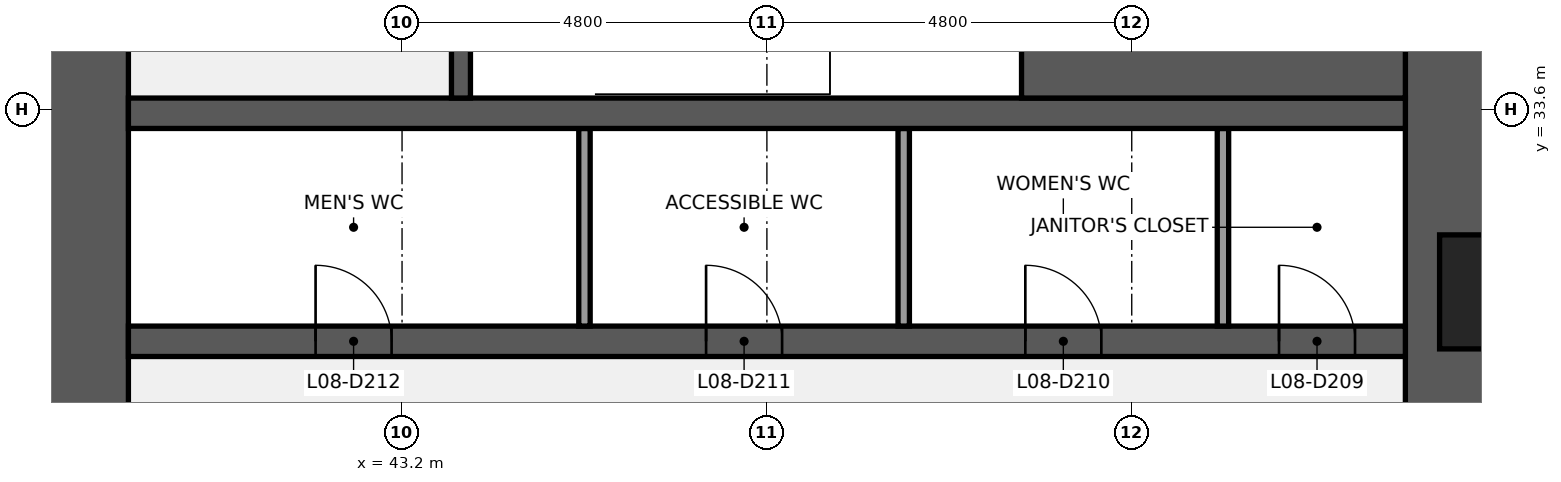
"""IFC4 building model, lengths in metres.
Left out: names, types, materials, properties, quantities, classifications, styles, units other than length and angle.
Written with IfcOpenShell. Run it as: python <this file> out.ifc"""

import sys

from ifc_helpers import new_model, si_unit, direction, frame, frame_2d, origin, place, context, subcontext, project, spatial, rectangle, extrude, element, fill, save


model = new_model("IFC4")
c1 = context("Model", 3, precision=1e-05, world=origin(), true_north=direction((0.0, 1.0)))
c2 = subcontext(c1, "Body", "Model", "MODEL_VIEW")
j1 = project(units=[si_unit("LENGTHUNIT", "METRE"), si_unit("PLANEANGLEUNIT", "RADIAN")], contexts=[c1])
p1 = place(None, origin())
s1 = spatial("IfcSite", under=j1, at=p1, CompositionType="ELEMENT")
p2 = place(p1, origin())
s2 = spatial("IfcBuilding", under=s1, at=p2, CompositionType="ELEMENT")
p3 = place(p2, frame((0.0, 0.0, 43.0)))
s3 = spatial("IfcBuildingStorey", under=s2, at=p3, CompositionType="ELEMENT", Elevation=43.0)
p4 = place(p3, frame((57.0, 38.4, 0.0), z_axis=(0.0, 0.0, 1.0), x_axis=(0.0, -1.0, 0.0)))
e1 = element("IfcWall", 1, at=p4, inside=s3, PredefinedType="SHEAR", context=c2, shape_type="SweptSolid", body=[
    extrude(rectangle(XDim=28.8, YDim=1.2, at=frame_2d((14.4, 0.0))), origin(), (0.0, 0.0, 1.0), 3.84),
])
p5 = place(p4, frame((18.45, 0.0, 0.9)))
e2 = element("IfcOpeningElement", 2, at=p5, cuts=e1, PredefinedType="OPENING", context=c2, shape_type="SweptSolid", body=[
    extrude(rectangle(XDim=1.5, YDim=1.5, at=frame_2d((0.75, 0.75))), frame((0.0, 0.61, 0.0), z_axis=(0.0, -1.0, 0.0), x_axis=(1.0, 0.0, 0.0)), (0.0, 0.0, 1.0), 1.22),
])
p6 = place(p4, frame((8.85, 0.0, 0.9)))
e3 = element("IfcOpeningElement", 3, at=p6, cuts=e1, PredefinedType="OPENING", context=c2, shape_type="SweptSolid", body=[
    extrude(rectangle(XDim=1.5, YDim=1.5, at=frame_2d((0.75, 0.75))), frame((0.0, 0.61, 0.0), z_axis=(0.0, -1.0, 0.0), x_axis=(1.0, 0.0, 0.0)), (0.0, 0.0, 1.0), 1.22),
])
p7 = place(p3, frame((39.0, 9.6, 0.0), z_axis=(0.0, 0.0, 1.0), x_axis=(0.0, 1.0, 0.0)))
e4 = element("IfcWall", 4, at=p7, inside=s3, PredefinedType="SHEAR", context=c2, shape_type="SweptSolid", body=[
    extrude(rectangle(XDim=28.8, YDim=1.2, at=frame_2d((14.4, 0.0))), origin(), (0.0, 0.0, 1.0), 3.84),
])
p8 = place(p7, frame((8.7, 0.0, 0.0)))
e5 = element("IfcOpeningElement", 5, at=p8, cuts=e4, PredefinedType="OPENING", context=c2, shape_type="SweptSolid", body=[
    extrude(rectangle(XDim=1.8, YDim=2.1, at=frame_2d((0.9, 1.05))), frame((0.0, 0.61, 0.0), z_axis=(0.0, -1.0, 0.0), x_axis=(1.0, 0.0, 0.0)), (0.0, 0.0, 1.0), 1.22),
])
p9 = place(p7, frame((18.3, 0.0, 0.0)))
e6 = element("IfcOpeningElement", 6, at=p9, cuts=e4, PredefinedType="OPENING", context=c2, shape_type="SweptSolid", body=[
    extrude(rectangle(XDim=1.8, YDim=2.1, at=frame_2d((0.9, 1.05))), frame((0.0, 0.61, 0.0), z_axis=(0.0, -1.0, 0.0), x_axis=(1.0, 0.0, 0.0)), (0.0, 0.0, 1.0), 1.22),
])
p10 = place(p3, frame((39.6, 30.55, 0.0), z_axis=(0.0, 0.0, 1.0), x_axis=(1.0, 0.0, 0.0)))
e7 = element("IfcWall", 7, at=p10, inside=s3, PredefinedType="SHEAR", context=c2, shape_type="SweptSolid", body=[
    extrude(rectangle(XDim=16.8, YDim=0.4, at=frame_2d((8.4, 0.0))), origin(), (0.0, 0.0, 1.0), 3.84),
])
p11 = place(p10, frame((15.137, 0.0, 0.0)))
e8 = element("IfcOpeningElement", 8, at=p11, cuts=e7, PredefinedType="OPENING", context=c2, shape_type="SweptSolid", body=[
    extrude(rectangle(XDim=1.0, YDim=2.1, at=frame_2d((0.5, 1.05))), frame((0.0, 0.21, 0.0), z_axis=(0.0, -1.0, 0.0), x_axis=(1.0, 0.0, 0.0)), (0.0, 0.0, 1.0), 0.42),
])
p12 = place(p10, frame((11.8, 0.0, 0.0)))
e9 = element("IfcOpeningElement", 9, at=p12, cuts=e7, PredefinedType="OPENING", context=c2, shape_type="SweptSolid", body=[
    extrude(rectangle(XDim=1.0, YDim=2.1, at=frame_2d((0.5, 1.05))), frame((0.0, 0.21, 0.0), z_axis=(0.0, -1.0, 0.0), x_axis=(1.0, 0.0, 0.0)), (0.0, 0.0, 1.0), 0.42),
])
p13 = place(p10, frame((7.6, 0.0, 0.0)))
e10 = element("IfcOpeningElement", 10, at=p13, cuts=e7, PredefinedType="OPENING", context=c2, shape_type="SweptSolid", body=[
    extrude(rectangle(XDim=1.0, YDim=2.1, at=frame_2d((0.5, 1.05))), frame((0.0, 0.21, 0.0), z_axis=(0.0, -1.0, 0.0), x_axis=(1.0, 0.0, 0.0)), (0.0, 0.0, 1.0), 0.42),
])
p14 = place(p10, frame((2.462, 0.0, 0.0)))
e11 = element("IfcOpeningElement", 11, at=p14, cuts=e7, PredefinedType="OPENING", context=c2, shape_type="SweptSolid", body=[
    extrude(rectangle(XDim=1.0, YDim=2.1, at=frame_2d((0.5, 1.05))), frame((0.0, 0.21, 0.0), z_axis=(0.0, -1.0, 0.0), x_axis=(1.0, 0.0, 0.0)), (0.0, 0.0, 1.0), 0.42),
])
for number, where, z_axis, x_axis in (
    (12, (54.0, 30.75, 0.0), (0.0, 0.0, 1.0), (0.0, 1.0, 0.0)),
    (13, (49.8, 30.75, 0.0), (0.0, 0.0, 1.0), (0.0, 1.0, 0.0)),
    (14, (45.6, 30.75, 0.0), (0.0, 0.0, 1.0), (0.0, 1.0, 0.0)),
):
    element("IfcWall", number, at=place(p3, frame(where, z_axis=z_axis, x_axis=x_axis)), inside=s3, PredefinedType="PARTITIONING", context=c2, shape_type="SweptSolid", body=[
        extrude(rectangle(XDim=2.6, YDim=0.15, at=frame_2d((1.3, 0.0))), origin(), (0.0, 0.0, 1.0), 3.84),
    ])
p15 = place(p3, frame((39.6, 33.55, 0.0), z_axis=(0.0, 0.0, 1.0), x_axis=(1.0, 0.0, 0.0)))
e15 = element("IfcWall", 15, at=p15, inside=s3, PredefinedType="SHEAR", context=c2, shape_type="SweptSolid", body=[
    extrude(rectangle(XDim=16.8, YDim=0.4, at=frame_2d((8.4, 0.0))), origin(), (0.0, 0.0, 1.0), 3.84),
])
p16 = place(p3, frame((51.35, 35.475, 0.0), z_axis=(0.0, 0.0, 1.0), x_axis=(1.0, 0.0, 0.0)))
e16 = element("IfcWall", 16, at=p16, inside=s3, PredefinedType="SHEAR", context=c2, shape_type="SweptSolid", body=[
    extrude(rectangle(XDim=5.05, YDim=3.45, at=frame_2d((2.525, 0.0))), origin(), (0.0, 0.0, 1.0), 3.84),
])
p17 = place(p3, frame((43.975, 33.75, 0.0), z_axis=(0.0, 0.0, 1.0), x_axis=(0.0, 1.0, 0.0)))
e17 = element("IfcWall", 17, at=p17, inside=s3, PredefinedType="SHEAR", context=c2, shape_type="SweptSolid", body=[
    extrude(rectangle(XDim=3.45, YDim=0.25, at=frame_2d((1.725, 0.0))), origin(), (0.0, 0.0, 1.0), 3.84),
])
p18 = place(p17, frame((1.175, 0.0, 0.0)))
e18 = element("IfcOpeningElement", 18, at=p18, cuts=e17, PredefinedType="OPENING", context=c2, shape_type="SweptSolid", body=[
    extrude(rectangle(XDim=1.1, YDim=2.1, at=frame_2d((0.55, 1.05))), frame((0.0, 0.135, 0.0), z_axis=(0.0, -1.0, 0.0), x_axis=(1.0, 0.0, 0.0)), (0.0, 0.0, 1.0), 0.27),
])
p19 = place(p11, origin())
e19 = element("IfcDoor", 19, at=p19, inside=s3, OperationType="SINGLE_SWING_LEFT", PredefinedType="DOOR", context=c2, shape_type="SweptSolid", body=[
    extrude(rectangle(XDim=1.0, YDim=2.1, at=frame_2d((0.5, 1.05))), frame((0.0, 0.025, 0.0), z_axis=(0.0, -1.0, 0.0), x_axis=(1.0, 0.0, 0.0)), (0.0, 0.0, 1.0), 0.05),
])
fill(e8, e19)
p20 = place(p12, origin())
e20 = element("IfcDoor", 20, at=p20, inside=s3, OperationType="SINGLE_SWING_LEFT", PredefinedType="DOOR", context=c2, shape_type="SweptSolid", body=[
    extrude(rectangle(XDim=1.0, YDim=2.1, at=frame_2d((0.5, 1.05))), frame((0.0, 0.025, 0.0), z_axis=(0.0, -1.0, 0.0), x_axis=(1.0, 0.0, 0.0)), (0.0, 0.0, 1.0), 0.05),
])
fill(e9, e20)
p21 = place(p13, origin())
e21 = element("IfcDoor", 21, at=p21, inside=s3, OperationType="SINGLE_SWING_LEFT", PredefinedType="DOOR", context=c2, shape_type="SweptSolid", body=[
    extrude(rectangle(XDim=1.0, YDim=2.1, at=frame_2d((0.5, 1.05))), frame((0.0, 0.025, 0.0), z_axis=(0.0, -1.0, 0.0), x_axis=(1.0, 0.0, 0.0)), (0.0, 0.0, 1.0), 0.05),
])
fill(e10, e21)
p22 = place(p14, origin())
e22 = element("IfcDoor", 22, at=p22, inside=s3, OperationType="SINGLE_SWING_LEFT", PredefinedType="DOOR", context=c2, shape_type="SweptSolid", body=[
    extrude(rectangle(XDim=1.0, YDim=2.1, at=frame_2d((0.5, 1.05))), frame((0.0, 0.025, 0.0), z_axis=(0.0, -1.0, 0.0), x_axis=(1.0, 0.0, 0.0)), (0.0, 0.0, 1.0), 0.05),
])
fill(e11, e22)
save(model, sys.argv[1])
